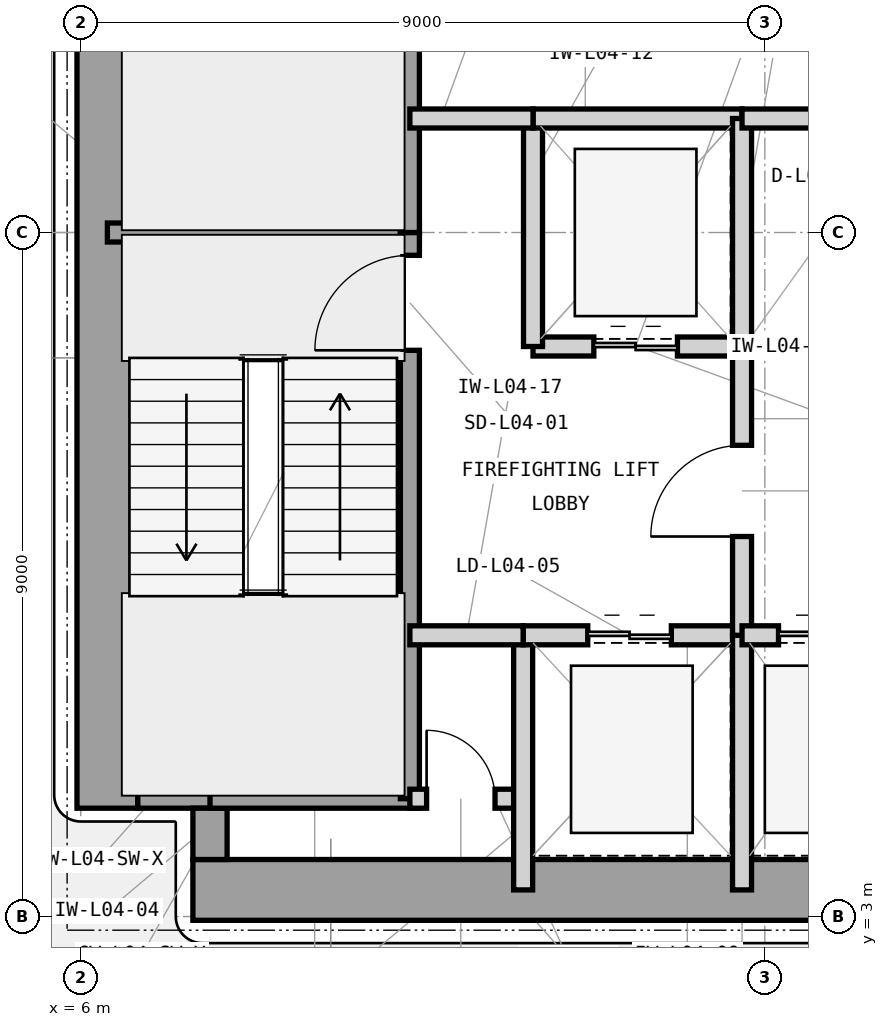
"""IFC4 building model, lengths in metres.
Left out: names, types, materials, properties, quantities, classifications, styles, units other than length and angle.
Written with IfcOpenShell. Run it as: python <this file> out.ifc"""

import sys

from ifc_helpers import new_model, si_unit, direction, frame, frame_2d, origin, place, context, subcontext, project, spatial, rectangle, extrude, element, fill, save


model = new_model("IFC4")
c1 = context("Model", 3, precision=1e-05, world=origin(), true_north=direction((0.0, 1.0)))
c2 = subcontext(c1, "Body", "Model", "MODEL_VIEW")
j1 = project(units=[si_unit("LENGTHUNIT", "METRE"), si_unit("PLANEANGLEUNIT", "RADIAN")], contexts=[c1])
p1 = place(None, origin())
s1 = spatial("IfcSite", under=j1, at=p1, CompositionType="ELEMENT")
p2 = place(p1, origin())
s2 = spatial("IfcBuilding", under=s1, at=p2, CompositionType="ELEMENT")
p3 = place(p2, frame((0.0, 0.0, 21.6)))
s3 = spatial("IfcBuildingStorey", under=s2, at=p3, CompositionType="ELEMENT", Elevation=21.6)
p4 = place(p3, frame((7.475, 3.35, 0.0), z_axis=(0.0, 0.0, 1.0), x_axis=(1.0, 0.0, 0.0)))
e1 = element("IfcWall", 1, at=p4, inside=s3, PredefinedType="SHEAR", context=c2, shape_type="SweptSolid", body=[
    extrude(rectangle(XDim=16.575, YDim=0.8, at=frame_2d((8.288, 0.0))), origin(), (0.0, 0.0, 1.0), 4.2),
])
p5 = place(p3, frame((6.35, 4.425, 0.0), z_axis=(0.0, 0.0, 1.0), x_axis=(0.0, 1.0, 0.0)))
e2 = element("IfcWall", 2, at=p5, inside=s3, PredefinedType="SHEAR", context=c2, shape_type="SweptSolid", body=[
    extrude(rectangle(XDim=15.15, YDim=0.8, at=frame_2d((7.575, 0.0))), origin(), (0.0, 0.0, 1.0), 4.2),
])
p6 = place(p3, frame((6.75, 4.65, 0.0), z_axis=(0.0, 0.0, 1.0), x_axis=(1.0, 0.0, 0.0)))
e3 = element("IfcWall", 3, at=p6, inside=s3, PredefinedType="SHEAR", context=c2, shape_type="SweptSolid", body=[
    extrude(rectangle(XDim=1.175, YDim=0.45, at=frame_2d((0.587, 0.0))), origin(), (0.0, 0.0, 1.0), 4.2),
])
p7 = place(p3, frame((7.7, 3.75, 0.0), z_axis=(0.0, 0.0, 1.0), x_axis=(0.0, 1.0, 0.0)))
e4 = element("IfcWall", 4, at=p7, inside=s3, PredefinedType="SHEAR", context=c2, shape_type="SweptSolid", body=[
    extrude(rectangle(XDim=0.675, YDim=0.45, at=frame_2d((0.337, 0.0))), origin(), (0.0, 0.0, 1.0), 4.2),
])
p8 = place(p3, frame((6.35, 12.0, 0.0), z_axis=(0.0, 0.0, 1.0), x_axis=(1.0, 0.0, 0.0)))
e5 = element("IfcWall", 5, at=p8, inside=s3, PredefinedType="SHEAR", context=c2, shape_type="SweptSolid", body=[
    extrude(rectangle(XDim=4.105, YDim=0.25, at=frame_2d((2.052, 0.0))), origin(), (0.0, 0.0, 1.0), 4.2),
])
p9 = place(p3, frame((7.7, 4.55, 0.0), z_axis=(0.0, 0.0, 1.0), x_axis=(1.0, 0.0, 0.0)))
e6 = element("IfcWall", 6, at=p9, inside=s3, PredefinedType="SHEAR", context=c2, shape_type="SweptSolid", body=[
    extrude(rectangle(XDim=2.755, YDim=0.25, at=frame_2d((1.377, 0.0))), origin(), (0.0, 0.0, 1.0), 4.2),
])
p10 = place(p3, frame((10.33, 4.55, 0.0), z_axis=(0.0, 0.0, 1.0), x_axis=(0.0, 1.0, 0.0)))
e7 = element("IfcWall", 7, at=p10, inside=s3, PredefinedType="SHEAR", context=c2, shape_type="SweptSolid", body=[
    extrude(rectangle(XDim=7.45, YDim=0.25, at=frame_2d((3.725, 0.0))), origin(), (0.0, 0.0, 1.0), 4.2),
])
p11 = place(p10, frame((5.9, 0.0, 0.0)))
e8 = element("IfcOpeningElement", 8, at=p11, cuts=e7, PredefinedType="OPENING", context=c2, shape_type="SweptSolid", body=[
    extrude(rectangle(XDim=1.25, YDim=2.2, at=frame_2d((0.625, 1.1))), frame((0.0, 0.135, 0.0), z_axis=(0.0, -1.0, 0.0), x_axis=(1.0, 0.0, 0.0)), (0.0, 0.0, 1.0), 0.27),
])
p12 = place(p3, frame((10.33, 12.0, 0.0), z_axis=(0.0, 0.0, 1.0), x_axis=(0.0, 1.0, 0.0)))
e9 = element("IfcWall", 9, at=p12, inside=s3, PredefinedType="SHEAR", context=c2, shape_type="SweptSolid", body=[
    extrude(rectangle(XDim=7.45, YDim=0.25, at=frame_2d((3.725, 0.0))), origin(), (0.0, 0.0, 1.0), 4.2),
])
p13 = place(p12, frame((5.85, 0.0, 0.0)))
e10 = element("IfcOpeningElement", 10, at=p13, cuts=e9, PredefinedType="OPENING", context=c2, shape_type="SweptSolid", body=[
    extrude(rectangle(XDim=1.25, YDim=2.2, at=frame_2d((0.625, 1.1))), frame((0.0, 0.135, 0.0), z_axis=(0.0, -1.0, 0.0), x_axis=(1.0, 0.0, 0.0)), (0.0, 0.0, 1.0), 0.27),
])
p14 = place(p3, frame((10.33, 4.55, 0.0), z_axis=(0.0, 0.0, 1.0), x_axis=(1.0, 0.0, 0.0)))
e11 = element("IfcWall", 11, at=p14, inside=s3, PredefinedType="PARTITIONING", context=c2, shape_type="SweptSolid", body=[
    extrude(rectangle(XDim=1.49, YDim=0.25, at=frame_2d((0.745, 0.0))), origin(), (0.0, 0.0, 1.0), 3.97),
])
p15 = place(p14, frame((0.22, 0.0, 0.0)))
e12 = element("IfcOpeningElement", 12, at=p15, cuts=e11, PredefinedType="OPENING", context=c2, shape_type="SweptSolid", body=[
    extrude(rectangle(XDim=0.9, YDim=2.1, at=frame_2d((0.45, 1.05))), frame((0.0, 0.135, 0.0), z_axis=(0.0, -1.0, 0.0), x_axis=(1.0, 0.0, 0.0)), (0.0, 0.0, 1.0), 0.27),
])
p16 = place(p3, frame((11.82, 3.35, 0.0), z_axis=(0.0, 0.0, 1.0), x_axis=(0.0, 1.0, 0.0)))
e13 = element("IfcWall", 13, at=p16, inside=s3, PredefinedType="PARTITIONING", context=c2, shape_type="SweptSolid", body=[
    extrude(rectangle(XDim=3.35, YDim=0.25, at=frame_2d((1.675, 0.0))), origin(), (0.0, 0.0, 1.0), 3.97),
])
p17 = place(p3, frame((11.82, 6.7, 0.0), z_axis=(0.0, 0.0, 1.0), x_axis=(1.0, 0.0, 0.0)))
e14 = element("IfcWall", 14, at=p17, inside=s3, PredefinedType="PARTITIONING", context=c2, shape_type="SweptSolid", body=[
    extrude(rectangle(XDim=2.88, YDim=0.25, at=frame_2d((1.44, 0.0))), origin(), (0.0, 0.0, 1.0), 3.426),
])
p18 = place(p17, frame((0.85, 0.0, 0.0)))
e15 = element("IfcOpeningElement", 15, at=p18, cuts=e14, PredefinedType="OPENING", context=c2, shape_type="SweptSolid", body=[
    extrude(rectangle(XDim=1.1, YDim=2.25, at=frame_2d((0.55, 1.125))), frame((0.0, 0.135, 0.0), z_axis=(0.0, -1.0, 0.0), x_axis=(1.0, 0.0, 0.0)), (0.0, 0.0, 1.0), 0.27),
])
p19 = place(p3, frame((14.7, 3.35, 0.0), z_axis=(0.0, 0.0, 1.0), x_axis=(0.0, 1.0, 0.0)))
e16 = element("IfcWall", 16, at=p19, inside=s3, PredefinedType="PARTITIONING", context=c2, shape_type="SweptSolid", body=[
    extrude(rectangle(XDim=3.35, YDim=0.25, at=frame_2d((1.675, 0.0))), origin(), (0.0, 0.0, 1.0), 3.97),
])
p20 = place(p3, frame((11.95, 10.5, 0.0), z_axis=(0.0, 0.0, 1.0), x_axis=(1.0, 0.0, 0.0)))
e17 = element("IfcWall", 17, at=p20, inside=s3, PredefinedType="PARTITIONING", context=c2, shape_type="SweptSolid", body=[
    extrude(rectangle(XDim=2.75, YDim=0.25, at=frame_2d((1.375, 0.0))), origin(), (0.0, 0.0, 1.0), 3.426),
])
p21 = place(p20, frame((0.8, 0.0, 0.0)))
e18 = element("IfcOpeningElement", 18, at=p21, cuts=e17, PredefinedType="OPENING", context=c2, shape_type="SweptSolid", body=[
    extrude(rectangle(XDim=1.1, YDim=2.25, at=frame_2d((0.55, 1.125))), frame((0.0, 0.135, 0.0), z_axis=(0.0, -1.0, 0.0), x_axis=(1.0, 0.0, 0.0)), (0.0, 0.0, 1.0), 0.27),
])
p22 = place(p3, frame((11.95, 10.5, 0.0), z_axis=(0.0, 0.0, 1.0), x_axis=(0.0, 1.0, 0.0)))
e19 = element("IfcWall", 19, at=p22, inside=s3, PredefinedType="PARTITIONING", context=c2, shape_type="SweptSolid", body=[
    extrude(rectangle(XDim=3.0, YDim=0.25, at=frame_2d((1.5, 0.0))), origin(), (0.0, 0.0, 1.0), 3.97),
])
p23 = place(p3, frame((11.95, 13.5, 0.0), z_axis=(0.0, 0.0, 1.0), x_axis=(1.0, 0.0, 0.0)))
e20 = element("IfcWall", 20, at=p23, inside=s3, PredefinedType="PARTITIONING", context=c2, shape_type="SweptSolid", body=[
    extrude(rectangle(XDim=2.75, YDim=0.25, at=frame_2d((1.375, 0.0))), origin(), (0.0, 0.0, 1.0), 3.426),
])
p24 = place(p3, frame((14.7, 10.5, 0.0), z_axis=(0.0, 0.0, 1.0), x_axis=(0.0, 1.0, 0.0)))
e21 = element("IfcWall", 21, at=p24, inside=s3, PredefinedType="PARTITIONING", context=c2, shape_type="SweptSolid", body=[
    extrude(rectangle(XDim=3.0, YDim=0.25, at=frame_2d((1.5, 0.0))), origin(), (0.0, 0.0, 1.0), 3.97),
])
p25 = place(p3, frame((14.7, 6.7, 0.0), z_axis=(0.0, 0.0, 1.0), x_axis=(0.0, 1.0, 0.0)))
e22 = element("IfcWall", 22, at=p25, inside=s3, PredefinedType="PARTITIONING", context=c2, shape_type="SweptSolid", body=[
    extrude(rectangle(XDim=3.8, YDim=0.25, at=frame_2d((1.9, 0.0))), origin(), (0.0, 0.0, 1.0), 3.97),
])
p26 = place(p25, frame((1.3, 0.0, 0.0)))
e23 = element("IfcOpeningElement", 23, at=p26, cuts=e22, PredefinedType="OPENING", context=c2, shape_type="SweptSolid", body=[
    extrude(rectangle(XDim=1.2, YDim=2.2, at=frame_2d((0.6, 1.1))), frame((0.0, 0.135, 0.0), z_axis=(0.0, -1.0, 0.0), x_axis=(1.0, 0.0, 0.0)), (0.0, 0.0, 1.0), 0.27),
])
p27 = place(p3, frame((10.33, 13.5, 0.0), z_axis=(0.0, 0.0, 1.0), x_axis=(1.0, 0.0, 0.0)))
e24 = element("IfcWall", 24, at=p27, inside=s3, PredefinedType="PARTITIONING", context=c2, shape_type="SweptSolid", body=[
    extrude(rectangle(XDim=1.62, YDim=0.25, at=frame_2d((0.81, 0.0))), origin(), (0.0, 0.0, 1.0), 3.426),
])
p28 = place(p3, frame((10.33, 6.7, 0.0), z_axis=(0.0, 0.0, 1.0), x_axis=(1.0, 0.0, 0.0)))
e25 = element("IfcWall", 25, at=p28, inside=s3, PredefinedType="PARTITIONING", context=c2, shape_type="SweptSolid", body=[
    extrude(rectangle(XDim=1.49, YDim=0.25, at=frame_2d((0.745, 0.0))), origin(), (0.0, 0.0, 1.0), 3.426),
])
p29 = place(p3, frame((14.7, 6.7, 0.0), z_axis=(0.0, 0.0, 1.0), x_axis=(1.0, 0.0, 0.0)))
e26 = element("IfcWall", 26, at=p29, inside=s3, PredefinedType="PARTITIONING", context=c2, shape_type="SweptSolid", body=[
    extrude(rectangle(XDim=2.15, YDim=0.25, at=frame_2d((1.075, 0.0))), origin(), (0.0, 0.0, 1.0), 3.426),
])
p30 = place(p29, frame((0.48, 0.0, 0.0)))
e27 = element("IfcOpeningElement", 27, at=p30, cuts=e26, PredefinedType="OPENING", context=c2, shape_type="SweptSolid", body=[
    extrude(rectangle(XDim=1.15, YDim=2.25, at=frame_2d((0.575, 1.125))), frame((0.0, 0.135, 0.0), z_axis=(0.0, -1.0, 0.0), x_axis=(1.0, 0.0, 0.0)), (0.0, 0.0, 1.0), 0.27),
])
p31 = place(p3, frame((14.7, 10.5, 0.0), z_axis=(0.0, 0.0, 1.0), x_axis=(1.0, 0.0, 0.0)))
e28 = element("IfcWall", 28, at=p31, inside=s3, PredefinedType="PARTITIONING", context=c2, shape_type="SweptSolid", body=[
    extrude(rectangle(XDim=2.15, YDim=0.25, at=frame_2d((1.075, 0.0))), origin(), (0.0, 0.0, 1.0), 3.426),
])
p32 = place(p3, frame((14.7, 13.5, 0.0), z_axis=(0.0, 0.0, 1.0), x_axis=(1.0, 0.0, 0.0)))
e29 = element("IfcWall", 29, at=p32, inside=s3, PredefinedType="PARTITIONING", context=c2, shape_type="SweptSolid", body=[
    extrude(rectangle(XDim=8.95, YDim=0.25, at=frame_2d((4.475, 0.0))), origin(), (0.0, 0.0, 1.0), 3.426),
])
p33 = place(p11, origin())
e30 = element("IfcDoor", 30, at=p33, inside=s3, OperationType="SINGLE_SWING_LEFT", PredefinedType="DOOR", context=c2, shape_type="SweptSolid", body=[
    extrude(rectangle(XDim=1.25, YDim=2.2, at=frame_2d((0.625, 1.1))), frame((0.0, 0.025, 0.0), z_axis=(0.0, -1.0, 0.0), x_axis=(1.0, 0.0, 0.0)), (0.0, 0.0, 1.0), 0.05),
])
fill(e8, e30)
p34 = place(p15, origin())
e31 = element("IfcDoor", 31, at=p34, inside=s3, OperationType="SINGLE_SWING_LEFT", PredefinedType="TRAPDOOR", context=c2, shape_type="SweptSolid", body=[
    extrude(rectangle(XDim=0.9, YDim=2.1, at=frame_2d((0.45, 1.05))), frame((0.0, 0.025, 0.0), z_axis=(0.0, -1.0, 0.0), x_axis=(1.0, 0.0, 0.0)), (0.0, 0.0, 1.0), 0.05),
])
fill(e12, e31)
p35 = place(p18, origin())
e32 = element("IfcDoor", 32, at=p35, inside=s3, OperationType="DOUBLE_DOOR_SLIDING", PredefinedType="DOOR", context=c2, shape_type="SweptSolid", body=[
    extrude(rectangle(XDim=1.1, YDim=2.25, at=frame_2d((0.55, 1.125))), frame((0.0, 0.025, 0.0), z_axis=(0.0, -1.0, 0.0), x_axis=(1.0, 0.0, 0.0)), (0.0, 0.0, 1.0), 0.05),
])
fill(e15, e32)
p36 = place(p21, origin())
e33 = element("IfcDoor", 33, at=p36, inside=s3, OperationType="DOUBLE_DOOR_SLIDING", PredefinedType="DOOR", context=c2, shape_type="SweptSolid", body=[
    extrude(rectangle(XDim=1.1, YDim=2.25, at=frame_2d((0.55, 1.125))), frame((0.0, 0.025, 0.0), z_axis=(0.0, -1.0, 0.0), x_axis=(1.0, 0.0, 0.0)), (0.0, 0.0, 1.0), 0.05),
])
fill(e18, e33)
p37 = place(p26, origin())
e34 = element("IfcDoor", 34, at=p37, inside=s3, OperationType="SINGLE_SWING_LEFT", PredefinedType="DOOR", context=c2, shape_type="SweptSolid", body=[
    extrude(rectangle(XDim=1.2, YDim=2.2, at=frame_2d((0.6, 1.1))), frame((0.0, 0.025, 0.0), z_axis=(0.0, -1.0, 0.0), x_axis=(1.0, 0.0, 0.0)), (0.0, 0.0, 1.0), 0.05),
])
fill(e23, e34)
p38 = place(p30, origin())
e35 = element("IfcDoor", 35, at=p38, inside=s3, OperationType="DOUBLE_DOOR_SLIDING", PredefinedType="DOOR", context=c2, shape_type="SweptSolid", body=[
    extrude(rectangle(XDim=1.15, YDim=2.25, at=frame_2d((0.575, 1.125))), frame((0.0, 0.025, 0.0), z_axis=(0.0, -1.0, 0.0), x_axis=(1.0, 0.0, 0.0)), (0.0, 0.0, 1.0), 0.05),
])
fill(e27, e35)
save(model, sys.argv[1])
